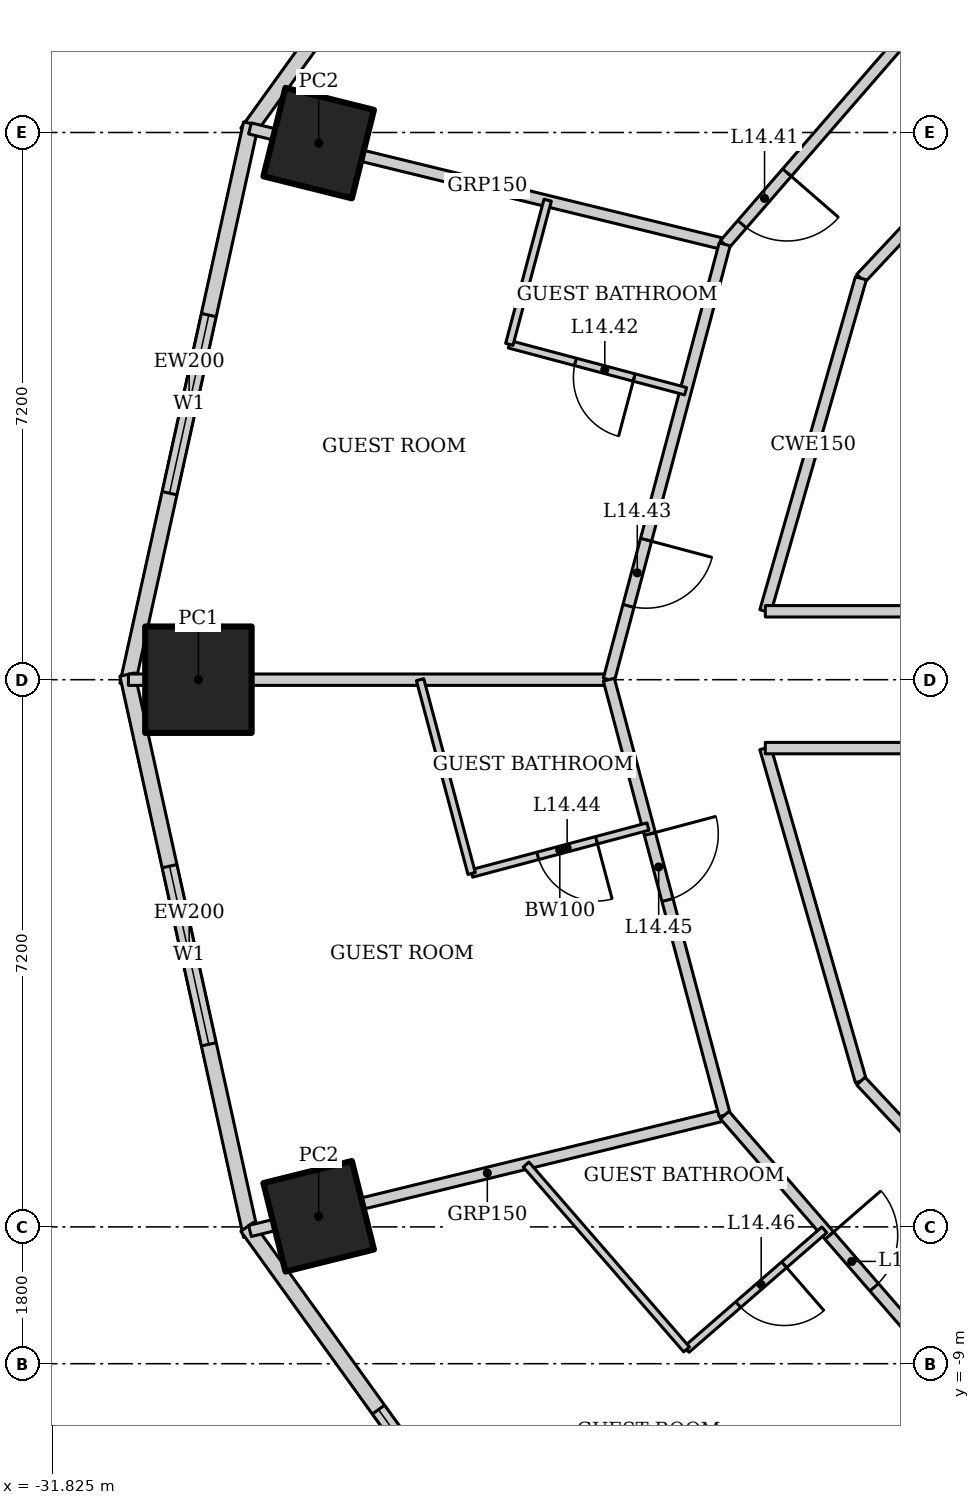
"""IFC4 building model, lengths in metres.
Left out: names, types, materials, properties, quantities, classifications, styles, units other than length and angle.
Written with IfcOpenShell. Run it as: python <this file> out.ifc"""

import sys

from ifc_helpers import new_model, si_unit, direction, frame, frame_2d, origin, origin_2d, place, context, subcontext, project, spatial, rectangle, hollow_rectangle, extrude, element, fill, save


model = new_model("IFC4")
c1 = context("Model", 3, precision=1e-05, world=origin(), true_north=direction((0.0, 1.0)))
c2 = subcontext(c1, "Body", "Model", "MODEL_VIEW")
j1 = project(units=[si_unit("LENGTHUNIT", "METRE"), si_unit("PLANEANGLEUNIT", "RADIAN")], contexts=[c1])
p1 = place(None, origin())
s1 = spatial("IfcSite", under=j1, at=p1, CompositionType="ELEMENT")
p2 = place(p1, origin())
s2 = spatial("IfcBuilding", under=s1, at=p2, CompositionType="ELEMENT")
p3 = place(p2, frame((0.0, 0.0, 65.8)))
s3 = spatial("IfcBuildingStorey", under=s2, at=p3, CompositionType="ELEMENT", Elevation=65.8)
p4 = place(p3, frame((-28.318, 7.06, 0.0), z_axis=(0.0, 0.0, 1.0), x_axis=(0.2419218956, 0.970295726276, 0.0)))
e1 = element("IfcColumn", 1, at=p4, inside=s3, PredefinedType="COLUMN", context=c2, shape_type="SweptSolid", body=[
    extrude(hollow_rectangle(XDim=1.2, YDim=1.2, WallThickness=0.1, at=origin_2d()), origin(), (0.0, 0.0, 1.0), 3.6),
])
p5 = place(p3, frame((-29.9, 0.0, 0.0), z_axis=(0.0, 0.0, 1.0), x_axis=(1.0, 0.0, 0.0)))
e2 = element("IfcColumn", 2, at=p5, inside=s3, PredefinedType="COLUMN", context=c2, shape_type="SweptSolid", body=[
    extrude(hollow_rectangle(XDim=1.4, YDim=1.4, WallThickness=0.1, at=origin_2d()), origin(), (0.0, 0.0, 1.0), 3.6),
])
p6 = place(p3, frame((-28.318, -7.06, 0.0), z_axis=(0.0, 0.0, 1.0), x_axis=(0.970295726276, 0.2419218956, 0.0)))
e3 = element("IfcColumn", 3, at=p6, inside=s3, PredefinedType="COLUMN", context=c2, shape_type="SweptSolid", body=[
    extrude(hollow_rectangle(XDim=1.2, YDim=1.2, WallThickness=0.1, at=origin_2d()), origin(), (0.0, 0.0, 1.0), 3.6),
])
p7 = place(p3, frame((-24.4, 13.957, 0.0), z_axis=(0.0, 0.0, 1.0), x_axis=(-0.583937613703, -0.811798536155, 0.0)))
e4 = element("IfcWall", 4, at=p7, inside=s3, PredefinedType="SOLIDWALL", context=c2, shape_type="SweptSolid", body=[
    extrude(rectangle(XDim=8.323, YDim=0.2, at=frame_2d((4.162, 0.0))), origin(), (0.0, 0.0, 1.0), 3.4),
])
p8 = place(p7, frame((2.961, 0.0, 0.5)))
e5 = element("IfcOpeningElement", 5, at=p8, cuts=e4, PredefinedType="OPENING", context=c2, shape_type="SweptSolid", body=[
    extrude(rectangle(XDim=2.4, YDim=2.2, at=frame_2d((1.2, 1.1))), frame((0.0, 0.11, 0.0), z_axis=(0.0, -1.0, 0.0), x_axis=(1.0, 0.0, 0.0)), (0.0, 0.0, 1.0), 0.22),
])
p9 = place(p3, frame((-29.208, 7.318, 0.0), z_axis=(0.0, 0.0, 1.0), x_axis=(-0.215238065514, -0.976561608478, 0.0)))
e6 = element("IfcWall", 6, at=p9, inside=s3, PredefinedType="SOLIDWALL", context=c2, shape_type="SweptSolid", body=[
    extrude(rectangle(XDim=7.562, YDim=0.2, at=frame_2d((3.781, 0.0))), origin(), (0.0, 0.0, 1.0), 3.4),
])
p10 = place(p9, frame((2.581, 0.0, 0.5)))
e7 = element("IfcOpeningElement", 7, at=p10, cuts=e6, PredefinedType="OPENING", context=c2, shape_type="SweptSolid", body=[
    extrude(rectangle(XDim=2.4, YDim=2.2, at=frame_2d((1.2, 1.1))), frame((0.0, 0.11, 0.0), z_axis=(0.0, -1.0, 0.0), x_axis=(1.0, 0.0, 0.0)), (0.0, 0.0, 1.0), 0.22),
])
p11 = place(p3, frame((-30.835, 0.067, 0.0), z_axis=(0.0, 0.0, 1.0), x_axis=(0.215238065514, -0.976561608478, 0.0)))
e8 = element("IfcWall", 8, at=p11, inside=s3, PredefinedType="SOLIDWALL", context=c2, shape_type="SweptSolid", body=[
    extrude(rectangle(XDim=7.562, YDim=0.2, at=frame_2d((3.781, 0.0))), origin(), (0.0, 0.0, 1.0), 3.4),
])
p12 = place(p11, frame((2.581, 0.0, 0.5)))
e9 = element("IfcOpeningElement", 9, at=p12, cuts=e8, PredefinedType="OPENING", context=c2, shape_type="SweptSolid", body=[
    extrude(rectangle(XDim=2.4, YDim=2.2, at=frame_2d((1.2, 1.1))), frame((0.0, 0.11, 0.0), z_axis=(0.0, -1.0, 0.0), x_axis=(1.0, 0.0, 0.0)), (0.0, 0.0, 1.0), 0.22),
])
p13 = place(p3, frame((-29.26, -7.2, 0.0), z_axis=(0.0, 0.0, 1.0), x_axis=(0.583937613703, -0.811798536155, 0.0)))
e10 = element("IfcWall", 10, at=p13, inside=s3, PredefinedType="SOLIDWALL", context=c2, shape_type="SweptSolid", body=[
    extrude(rectangle(XDim=8.323, YDim=0.2, at=frame_2d((4.162, 0.0))), origin(), (0.0, 0.0, 1.0), 3.4),
])
p14 = place(p13, frame((2.961, 0.0, 0.5)))
e11 = element("IfcOpeningElement", 11, at=p14, cuts=e10, PredefinedType="OPENING", context=c2, shape_type="SweptSolid", body=[
    extrude(rectangle(XDim=2.4, YDim=2.2, at=frame_2d((1.2, 1.1))), frame((0.0, 0.11, 0.0), z_axis=(0.0, -1.0, 0.0), x_axis=(1.0, 0.0, 0.0)), (0.0, 0.0, 1.0), 0.22),
])
p15 = place(p3, frame((-29.222, 7.254, 0.0), z_axis=(0.0, 0.0, 1.0), x_axis=(0.971456980633, -0.237215797913, 0.0)))
e12 = element("IfcWall", 12, at=p15, inside=s3, PredefinedType="PARTITIONING", context=c2, shape_type="SweptSolid", body=[
    extrude(rectangle(XDim=6.429, YDim=0.15, at=frame_2d((3.215, 0.0))), origin(), (0.0, 0.0, 1.0), 2.332),
])
p16 = place(p3, frame((-30.821, 0.0, 0.0), z_axis=(0.0, 0.0, 1.0), x_axis=(1.0, 0.0, 0.0)))
e13 = element("IfcWall", 13, at=p16, inside=s3, PredefinedType="PARTITIONING", context=c2, shape_type="SweptSolid", body=[
    extrude(rectangle(XDim=6.321, YDim=0.15, at=frame_2d((3.16, 0.0))), origin(), (0.0, 0.0, 1.0), 2.528),
])
p17 = place(p3, frame((-29.222, -7.254, 0.0), z_axis=(0.0, 0.0, 1.0), x_axis=(0.971456980633, 0.237215797913, 0.0)))
e14 = element("IfcWall", 14, at=p17, inside=s3, PredefinedType="PARTITIONING", context=c2, shape_type="SweptSolid", body=[
    extrude(rectangle(XDim=6.429, YDim=0.15, at=frame_2d((3.215, 0.0))), origin(), (0.0, 0.0, 1.0), 2.332),
])
p18 = place(p3, frame((-18.681, 10.675, 0.0), z_axis=(0.0, 0.0, 1.0), x_axis=(-0.655599989166, -0.755108372491, 0.0)))
e15 = element("IfcWall", 15, at=p18, inside=s3, PredefinedType="PARTITIONING", context=c2, shape_type="SweptSolid", body=[
    extrude(rectangle(XDim=6.551, YDim=0.15, at=frame_2d((3.275, 0.0))), origin(), (0.0, 0.0, 1.0), 3.45),
])
p19 = place(p18, frame((5.301, 0.0, 0.0)))
e16 = element("IfcOpeningElement", 16, at=p19, cuts=e15, PredefinedType="OPENING", context=c2, shape_type="SweptSolid", body=[
    extrude(rectangle(XDim=0.9, YDim=2.1, at=frame_2d((0.45, 1.05))), frame((0.0, 0.085, 0.0), z_axis=(0.0, -1.0, 0.0), x_axis=(1.0, 0.0, 0.0)), (0.0, 0.0, 1.0), 0.17),
])
p20 = place(p3, frame((-22.976, 5.729, 0.0), z_axis=(0.0, 0.0, 1.0), x_axis=(-0.257083265334, -0.966389256296, 0.0)))
e17 = element("IfcWall", 17, at=p20, inside=s3, PredefinedType="PARTITIONING", context=c2, shape_type="SweptSolid", body=[
    extrude(rectangle(XDim=5.928, YDim=0.15, at=frame_2d((2.964, 0.0))), origin(), (0.0, 0.0, 1.0), 3.45),
])
p21 = place(p20, frame((4.023, 0.0, 0.0)))
e18 = element("IfcOpeningElement", 18, at=p21, cuts=e17, PredefinedType="OPENING", context=c2, shape_type="SweptSolid", body=[
    extrude(rectangle(XDim=0.9, YDim=2.1, at=frame_2d((0.45, 1.05))), frame((0.0, 0.085, 0.0), z_axis=(0.0, -1.0, 0.0), x_axis=(1.0, 0.0, 0.0)), (0.0, 0.0, 1.0), 0.17),
])
p22 = place(p3, frame((-24.5, 0.0, 0.0), z_axis=(0.0, 0.0, 1.0), x_axis=(0.257083265334, -0.966389256296, 0.0)))
e19 = element("IfcWall", 19, at=p22, inside=s3, PredefinedType="PARTITIONING", context=c2, shape_type="SweptSolid", body=[
    extrude(rectangle(XDim=5.928, YDim=0.15, at=frame_2d((2.964, 0.0))), origin(), (0.0, 0.0, 1.0), 3.45),
])
p23 = place(p22, frame((2.1, 0.0, 0.0)))
e20 = element("IfcOpeningElement", 20, at=p23, cuts=e19, PredefinedType="OPENING", context=c2, shape_type="SweptSolid", body=[
    extrude(rectangle(XDim=0.9, YDim=2.1, at=frame_2d((0.45, 1.05))), frame((0.0, 0.085, 0.0), z_axis=(0.0, -1.0, 0.0), x_axis=(1.0, 0.0, 0.0)), (0.0, 0.0, 1.0), 0.17),
])
p24 = place(p3, frame((-22.976, -5.729, 0.0), z_axis=(0.0, 0.0, 1.0), x_axis=(0.655599989166, -0.755108372491, 0.0)))
e21 = element("IfcWall", 21, at=p24, inside=s3, PredefinedType="PARTITIONING", context=c2, shape_type="SweptSolid", body=[
    extrude(rectangle(XDim=6.551, YDim=0.15, at=frame_2d((3.275, 0.0))), origin(), (0.0, 0.0, 1.0), 3.45),
])
p25 = place(p24, frame((2.1, 0.0, 0.0)))
e22 = element("IfcOpeningElement", 22, at=p25, cuts=e21, PredefinedType="OPENING", context=c2, shape_type="SweptSolid", body=[
    extrude(rectangle(XDim=0.9, YDim=2.1, at=frame_2d((0.45, 1.05))), frame((0.0, 0.085, 0.0), z_axis=(0.0, -1.0, 0.0), x_axis=(1.0, 0.0, 0.0)), (0.0, 0.0, 1.0), 0.17),
])
p26 = place(p3, frame((-17.021, 9.726, 0.0), z_axis=(0.0, 0.0, 1.0), x_axis=(-0.68365836236, -0.729802194828, 0.0)))
e23 = element("IfcWall", 23, at=p26, inside=s3, PredefinedType="PARTITIONING", context=c2, shape_type="SweptSolid", body=[
    extrude(rectangle(XDim=6.09, YDim=0.15, at=frame_2d((3.045, 0.0))), origin(), (0.0, 0.0, 1.0), 3.45),
])
p27 = place(p26, frame((2.545, 0.0, 0.0)))
e24 = element("IfcOpeningElement", 24, at=p27, cuts=e23, PredefinedType="OPENING", context=c2, shape_type="SweptSolid", body=[
    extrude(rectangle(XDim=1.0, YDim=2.1, at=frame_2d((0.5, 1.05))), frame((0.0, 0.085, 0.0), z_axis=(0.0, -1.0, 0.0), x_axis=(1.0, 0.0, 0.0)), (0.0, 0.0, 1.0), 0.17),
])
for number, where, z_axis, x_axis in (
    (25, (-21.184, 5.282, 0.0), (0.0, 0.0, 1.0), (-0.276, -0.961, 0.0)),
    (26, (-22.442, -0.9, 0.0), (0.0, 0.0, 1.0), (0.276, -0.961, 0.0)),
):
    element("IfcWall", number, at=place(p3, frame(where, z_axis=z_axis, x_axis=x_axis)), inside=s3, PredefinedType="PARTITIONING", context=c2, shape_type="SweptSolid", body=[
        extrude(rectangle(XDim=4.559, YDim=0.15, at=frame_2d((2.279, 0.0))), origin(), (0.0, 0.0, 1.0), 3.45),
    ])
p28 = place(p3, frame((-21.184, -5.282, 0.0), z_axis=(0.0, 0.0, 1.0), x_axis=(0.68365836236, -0.729802194828, 0.0)))
e27 = element("IfcWall", 27, at=p28, inside=s3, PredefinedType="PARTITIONING", context=c2, shape_type="SweptSolid", body=[
    extrude(rectangle(XDim=6.09, YDim=0.15, at=frame_2d((3.045, 0.0))), origin(), (0.0, 0.0, 1.0), 3.45),
])
p29 = place(p28, frame((2.545, 0.0, 0.0)))
e28 = element("IfcOpeningElement", 28, at=p29, cuts=e27, PredefinedType="OPENING", context=c2, shape_type="SweptSolid", body=[
    extrude(rectangle(XDim=1.0, YDim=2.1, at=frame_2d((0.5, 1.05))), frame((0.0, 0.085, 0.0), z_axis=(0.0, -1.0, 0.0), x_axis=(1.0, 0.0, 0.0)), (0.0, 0.0, 1.0), 0.17),
])
p30 = place(p3, frame((-23.49, 3.796, 0.0), z_axis=(0.0, 0.0, 1.0), x_axis=(-0.96639514992, 0.257061109879, 0.0)))
e29 = element("IfcWall", 29, at=p30, inside=s3, PredefinedType="PARTITIONING", context=c2, shape_type="SweptSolid", body=[
    extrude(rectangle(XDim=2.4, YDim=0.1, at=frame_2d((1.2, 0.0))), origin(), (0.0, 0.0, 1.0), 3.45),
])
p31 = place(p30, frame((0.7, 0.0, 0.0)))
e30 = element("IfcOpeningElement", 30, at=p31, cuts=e29, PredefinedType="OPENING", context=c2, shape_type="SweptSolid", body=[
    extrude(rectangle(XDim=0.8, YDim=2.1, at=frame_2d((0.4, 1.05))), frame((0.0, 0.06, 0.0), z_axis=(0.0, -1.0, 0.0), x_axis=(1.0, 0.0, 0.0)), (0.0, 0.0, 1.0), 0.12),
])
p32 = place(p3, frame((-25.81, 4.413, 0.0), z_axis=(0.0, 0.0, 1.0), x_axis=(0.257143831715, 0.96637314212, 0.0)))
e31 = element("IfcWall", 31, at=p32, inside=s3, PredefinedType="PARTITIONING", context=c2, shape_type="SweptSolid", body=[
    extrude(rectangle(XDim=1.962, YDim=0.1, at=frame_2d((0.981, 0.0))), origin(), (0.0, 0.0, 1.0), 3.45),
])
p33 = place(p3, frame((-23.986, -1.933, 0.0), z_axis=(0.0, 0.0, 1.0), x_axis=(-0.96639514992, -0.257061109879, 0.0)))
e32 = element("IfcWall", 32, at=p33, inside=s3, PredefinedType="PARTITIONING", context=c2, shape_type="SweptSolid", body=[
    extrude(rectangle(XDim=2.4, YDim=0.1, at=frame_2d((1.2, 0.0))), origin(), (0.0, 0.0, 1.0), 3.45),
])
p34 = place(p33, frame((0.7, 0.0, 0.0)))
e33 = element("IfcOpeningElement", 33, at=p34, cuts=e32, PredefinedType="OPENING", context=c2, shape_type="SweptSolid", body=[
    extrude(rectangle(XDim=0.8, YDim=2.1, at=frame_2d((0.4, 1.05))), frame((0.0, 0.06, 0.0), z_axis=(0.0, -1.0, 0.0), x_axis=(1.0, 0.0, 0.0)), (0.0, 0.0, 1.0), 0.12),
])
p35 = place(p3, frame((-26.305, -2.55, 0.0), z_axis=(0.0, 0.0, 1.0), x_axis=(-0.257052122515, 0.966397540513, 0.0)))
e34 = element("IfcWall", 34, at=p35, inside=s3, PredefinedType="PARTITIONING", context=c2, shape_type="SweptSolid", body=[
    extrude(rectangle(XDim=2.638, YDim=0.1, at=frame_2d((1.319, 0.0))), origin(), (0.0, 0.0, 1.0), 3.45),
])
p36 = place(p3, frame((-21.665, -7.239, 0.0), z_axis=(0.0, 0.0, 1.0), x_axis=(-0.755098052661, -0.655611875172, 0.0)))
e35 = element("IfcWall", 35, at=p36, inside=s3, PredefinedType="PARTITIONING", context=c2, shape_type="SweptSolid", body=[
    extrude(rectangle(XDim=2.4, YDim=0.1, at=frame_2d((1.2, 0.0))), origin(), (0.0, 0.0, 1.0), 3.45),
])
p37 = place(p36, frame((0.7, 0.0, 0.0)))
e36 = element("IfcOpeningElement", 36, at=p37, cuts=e35, PredefinedType="OPENING", context=c2, shape_type="SweptSolid", body=[
    extrude(rectangle(XDim=0.8, YDim=2.1, at=frame_2d((0.4, 1.05))), frame((0.0, 0.06, 0.0), z_axis=(0.0, -1.0, 0.0), x_axis=(1.0, 0.0, 0.0)), (0.0, 0.0, 1.0), 0.12),
])
p38 = place(p3, frame((-23.477, -8.812, 0.0), z_axis=(0.0, 0.0, 1.0), x_axis=(-0.655596826012, 0.755111118792, 0.0)))
e37 = element("IfcWall", 37, at=p38, inside=s3, PredefinedType="PARTITIONING", context=c2, shape_type="SweptSolid", body=[
    extrude(rectangle(XDim=3.221, YDim=0.1, at=frame_2d((1.611, 0.0))), origin(), (0.0, 0.0, 1.0), 3.45),
])
for number, where, z_axis, x_axis in (
    (38, (-19.835, -0.9, 0.0), (0.0, 0.0, 1.0), (-1.0, 0.0, 0.0)),
    (39, (-19.835, 0.9, 0.0), (0.0, 0.0, 1.0), (-1.0, 0.0, 0.0)),
):
    element("IfcWall", number, at=place(p3, frame(where, z_axis=z_axis, x_axis=x_axis)), inside=s3, PredefinedType="PARTITIONING", context=c2, shape_type="SweptSolid", body=[
        extrude(rectangle(XDim=2.607, YDim=0.15, at=frame_2d((1.303, 0.0))), origin(), (0.0, 0.0, 1.0), 3.45),
    ])
p39 = place(p10, origin())
e40 = element("IfcWindow", 40, at=p39, inside=s3, PartitioningType="SINGLE_PANEL", PredefinedType="WINDOW", context=c2, shape_type="SweptSolid", body=[
    extrude(rectangle(XDim=2.4, YDim=2.2, at=frame_2d((1.2, 1.1))), frame((0.0, 0.03, 0.0), z_axis=(0.0, -1.0, 0.0), x_axis=(1.0, 0.0, 0.0)), (0.0, 0.0, 1.0), 0.06),
])
fill(e7, e40)
p40 = place(p12, origin())
e41 = element("IfcWindow", 41, at=p40, inside=s3, PartitioningType="SINGLE_PANEL", PredefinedType="WINDOW", context=c2, shape_type="SweptSolid", body=[
    extrude(rectangle(XDim=2.4, YDim=2.2, at=frame_2d((1.2, 1.1))), frame((0.0, 0.03, 0.0), z_axis=(0.0, -1.0, 0.0), x_axis=(1.0, 0.0, 0.0)), (0.0, 0.0, 1.0), 0.06),
])
fill(e9, e41)
p41 = place(p14, origin())
e42 = element("IfcWindow", 42, at=p41, inside=s3, PartitioningType="SINGLE_PANEL", PredefinedType="WINDOW", context=c2, shape_type="SweptSolid", body=[
    extrude(rectangle(XDim=2.4, YDim=2.2, at=frame_2d((1.2, 1.1))), frame((0.0, 0.03, 0.0), z_axis=(0.0, -1.0, 0.0), x_axis=(1.0, 0.0, 0.0)), (0.0, 0.0, 1.0), 0.06),
])
fill(e11, e42)
p42 = place(p19, origin())
e43 = element("IfcDoor", 43, at=p42, inside=s3, OperationType="SINGLE_SWING_LEFT", PredefinedType="DOOR", context=c2, shape_type="SweptSolid", body=[
    extrude(rectangle(XDim=0.9, YDim=2.1, at=frame_2d((0.45, 1.05))), frame((0.0, 0.025, 0.0), z_axis=(0.0, -1.0, 0.0), x_axis=(1.0, 0.0, 0.0)), (0.0, 0.0, 1.0), 0.05),
])
fill(e16, e43)
p43 = place(p31, origin())
e44 = element("IfcDoor", 44, at=p43, inside=s3, OperationType="SINGLE_SWING_LEFT", PredefinedType="DOOR", context=c2, shape_type="SweptSolid", body=[
    extrude(rectangle(XDim=0.8, YDim=2.1, at=frame_2d((0.4, 1.05))), frame((0.0, 0.025, 0.0), z_axis=(0.0, -1.0, 0.0), x_axis=(1.0, 0.0, 0.0)), (0.0, 0.0, 1.0), 0.05),
])
fill(e30, e44)
p44 = place(p21, origin())
e45 = element("IfcDoor", 45, at=p44, inside=s3, OperationType="SINGLE_SWING_LEFT", PredefinedType="DOOR", context=c2, shape_type="SweptSolid", body=[
    extrude(rectangle(XDim=0.9, YDim=2.1, at=frame_2d((0.45, 1.05))), frame((0.0, 0.025, 0.0), z_axis=(0.0, -1.0, 0.0), x_axis=(1.0, 0.0, 0.0)), (0.0, 0.0, 1.0), 0.05),
])
fill(e18, e45)
p45 = place(p34, origin())
e46 = element("IfcDoor", 46, at=p45, inside=s3, OperationType="SINGLE_SWING_LEFT", PredefinedType="DOOR", context=c2, shape_type="SweptSolid", body=[
    extrude(rectangle(XDim=0.8, YDim=2.1, at=frame_2d((0.4, 1.05))), frame((0.0, 0.025, 0.0), z_axis=(0.0, -1.0, 0.0), x_axis=(1.0, 0.0, 0.0)), (0.0, 0.0, 1.0), 0.05),
])
fill(e33, e46)
p46 = place(p23, origin())
e47 = element("IfcDoor", 47, at=p46, inside=s3, OperationType="SINGLE_SWING_LEFT", PredefinedType="DOOR", context=c2, shape_type="SweptSolid", body=[
    extrude(rectangle(XDim=0.9, YDim=2.1, at=frame_2d((0.45, 1.05))), frame((0.0, 0.025, 0.0), z_axis=(0.0, -1.0, 0.0), x_axis=(1.0, 0.0, 0.0)), (0.0, 0.0, 1.0), 0.05),
])
fill(e20, e47)
p47 = place(p37, origin())
e48 = element("IfcDoor", 48, at=p47, inside=s3, OperationType="SINGLE_SWING_LEFT", PredefinedType="DOOR", context=c2, shape_type="SweptSolid", body=[
    extrude(rectangle(XDim=0.8, YDim=2.1, at=frame_2d((0.4, 1.05))), frame((0.0, 0.025, 0.0), z_axis=(0.0, -1.0, 0.0), x_axis=(1.0, 0.0, 0.0)), (0.0, 0.0, 1.0), 0.05),
])
fill(e36, e48)
p48 = place(p25, origin())
e49 = element("IfcDoor", 49, at=p48, inside=s3, OperationType="SINGLE_SWING_LEFT", PredefinedType="DOOR", context=c2, shape_type="SweptSolid", body=[
    extrude(rectangle(XDim=0.9, YDim=2.1, at=frame_2d((0.45, 1.05))), frame((0.0, 0.025, 0.0), z_axis=(0.0, -1.0, 0.0), x_axis=(1.0, 0.0, 0.0)), (0.0, 0.0, 1.0), 0.05),
])
fill(e22, e49)
save(model, sys.argv[1])
